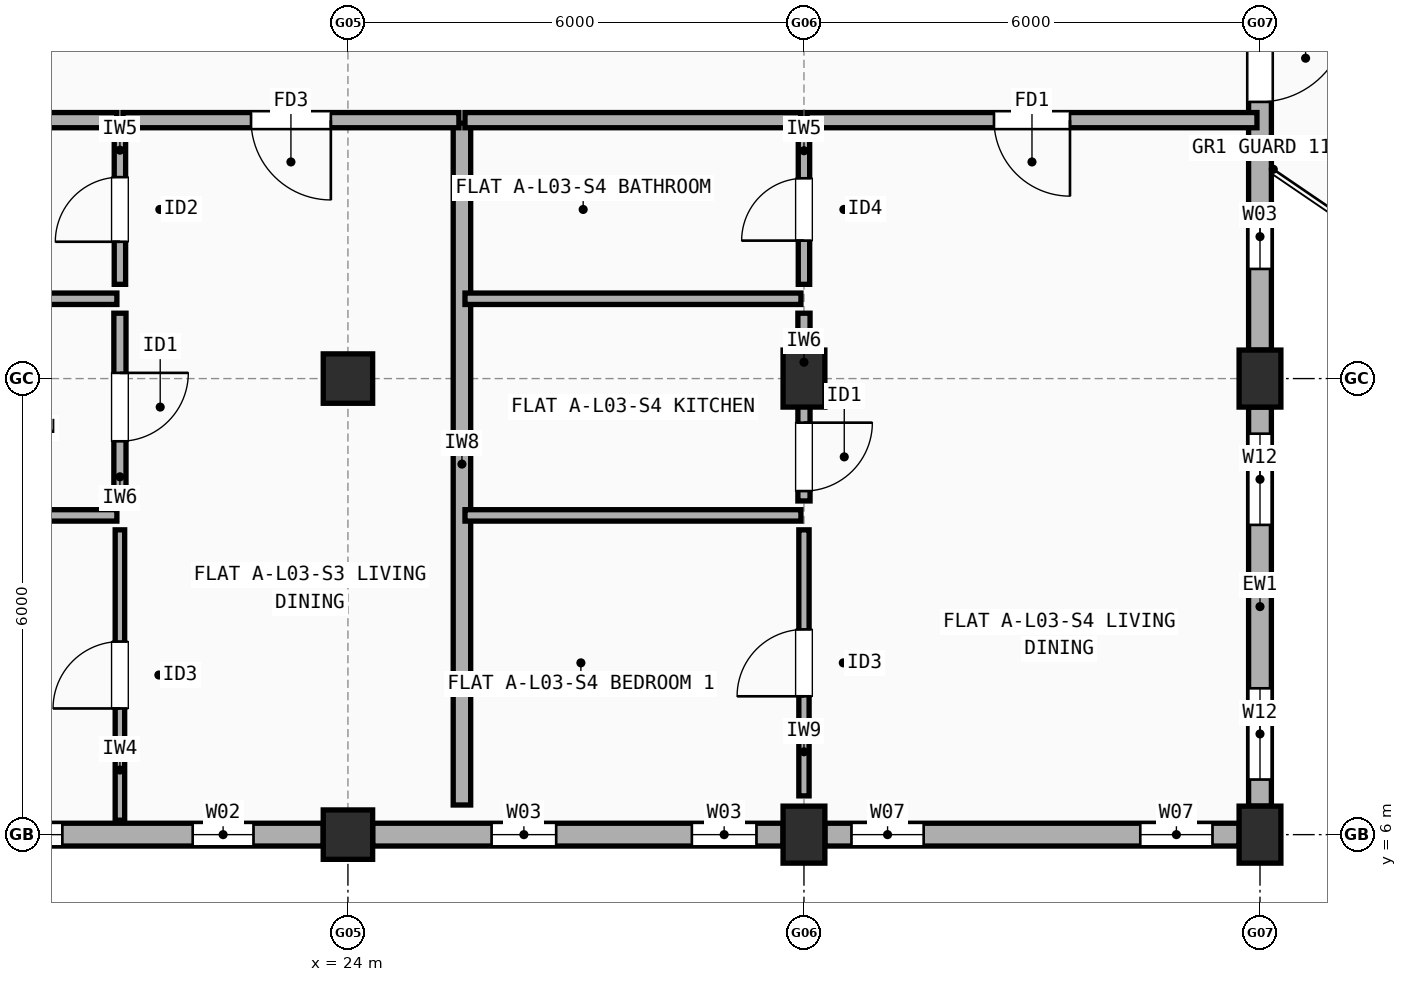
"""IFC4 building model, lengths in metres.
Left out: names, types, materials, properties, quantities, classifications, styles, units other than length and angle.
Written with IfcOpenShell. Run it as: python <this file> out.ifc"""

import sys

from ifc_helpers import new_model, si_unit, direction, frame, frame_2d, origin, origin_2d, place, context, subcontext, project, spatial, rectangle, extrude, element, fill, save


model = new_model("IFC4")
c1 = context("Model", 3, precision=1e-05, world=origin(), true_north=direction((0.0, 1.0)))
c2 = subcontext(c1, "Body", "Model", "MODEL_VIEW")
j1 = project(units=[si_unit("LENGTHUNIT", "METRE"), si_unit("PLANEANGLEUNIT", "RADIAN")], contexts=[c1])
p1 = place(None, origin())
s1 = spatial("IfcSite", under=j1, at=p1, CompositionType="ELEMENT")
p2 = place(p1, origin())
s2 = spatial("IfcBuilding", under=s1, at=p2, CompositionType="ELEMENT")
p3 = place(p2, frame((0.0, 0.0, 10.9)))
s3 = spatial("IfcBuildingStorey", under=s2, at=p3, CompositionType="ELEMENT", Elevation=10.9)
for number, where, z_axis, x_axis in (
    (1, (24.0, 6.0, 0.0), (0.0, 0.0, 1.0), (1.0, 0.0, 0.0)),
    (2, (24.0, 12.0, 0.0), (0.0, 0.0, 1.0), (1.0, 0.0, 0.0)),
):
    element("IfcColumn", number, at=place(p3, frame(where, z_axis=z_axis, x_axis=x_axis)), inside=s3, PredefinedType="COLUMN", context=c2, shape_type="SweptSolid", body=[
        extrude(rectangle(XDim=0.65, YDim=0.65, at=origin_2d()), origin(), (0.0, 0.0, 1.0), 2.96),
    ])
for number, where, z_axis, x_axis in (
    (3, (30.0, 6.0, 0.0), (0.0, 0.0, 1.0), (1.0, 0.0, 0.0)),
    (4, (30.0, 12.0, 0.0), (0.0, 0.0, 1.0), (1.0, 0.0, 0.0)),
    (5, (36.0, 6.0, 0.0), (0.0, 0.0, 1.0), (1.0, 0.0, 0.0)),
    (6, (36.0, 12.0, 0.0), (0.0, 0.0, 1.0), (1.0, 0.0, 0.0)),
):
    element("IfcColumn", number, at=place(p3, frame(where, z_axis=z_axis, x_axis=x_axis)), inside=s3, PredefinedType="COLUMN", context=c2, shape_type="SweptSolid", body=[
        extrude(rectangle(XDim=0.55, YDim=0.75, at=origin_2d()), origin(), (0.0, 0.0, 1.0), 2.96),
    ])
p4 = place(p3, frame((18.325, 6.0, 0.0), z_axis=(0.0, 0.0, 1.0), x_axis=(1.0, 0.0, 0.0)))
e7 = element("IfcWall", 7, at=p4, inside=s3, PredefinedType="STANDARD", context=c2, shape_type="SweptSolid", body=[
    extrude(rectangle(XDim=5.35, YDim=0.3, at=frame_2d((2.675, 0.0))), origin(), (0.0, 0.0, 1.0), 2.442),
])
p5 = place(p4, frame((0.718, 0.0, 0.9)))
e8 = element("IfcOpeningElement", 8, at=p5, cuts=e7, PredefinedType="OPENING", context=c2, shape_type="SweptSolid", body=[
    extrude(rectangle(XDim=1.2, YDim=1.35, at=frame_2d((0.6, 0.675))), frame((0.0, 0.16, 0.0), z_axis=(0.0, -1.0, 0.0), x_axis=(1.0, 0.0, 0.0)), (0.0, 0.0, 1.0), 0.32),
])
p6 = place(p4, frame((3.633, 0.0, 0.9)))
e9 = element("IfcOpeningElement", 9, at=p6, cuts=e7, PredefinedType="OPENING", context=c2, shape_type="SweptSolid", body=[
    extrude(rectangle(XDim=0.8, YDim=1.2, at=frame_2d((0.4, 0.6))), frame((0.0, 0.16, 0.0), z_axis=(0.0, -1.0, 0.0), x_axis=(1.0, 0.0, 0.0)), (0.0, 0.0, 1.0), 0.32),
])
p7 = place(p3, frame((24.325, 6.0, 0.0), z_axis=(0.0, 0.0, 1.0), x_axis=(1.0, 0.0, 0.0)))
e10 = element("IfcWall", 10, at=p7, inside=s3, PredefinedType="STANDARD", context=c2, shape_type="SweptSolid", body=[
    extrude(rectangle(XDim=5.4, YDim=0.3, at=frame_2d((2.7, 0.0))), origin(), (0.0, 0.0, 1.0), 2.442),
])
p8 = place(p7, frame((1.565, 0.0, 0.9)))
e11 = element("IfcOpeningElement", 11, at=p8, cuts=e10, PredefinedType="OPENING", context=c2, shape_type="SweptSolid", body=[
    extrude(rectangle(XDim=0.85, YDim=1.25, at=frame_2d((0.425, 0.625))), frame((0.0, 0.16, 0.0), z_axis=(0.0, -1.0, 0.0), x_axis=(1.0, 0.0, 0.0)), (0.0, 0.0, 1.0), 0.32),
])
p9 = place(p7, frame((4.2, 0.0, 0.9)))
e12 = element("IfcOpeningElement", 12, at=p9, cuts=e10, PredefinedType="OPENING", context=c2, shape_type="SweptSolid", body=[
    extrude(rectangle(XDim=0.85, YDim=1.25, at=frame_2d((0.425, 0.625))), frame((0.0, 0.16, 0.0), z_axis=(0.0, -1.0, 0.0), x_axis=(1.0, 0.0, 0.0)), (0.0, 0.0, 1.0), 0.32),
])
p10 = place(p3, frame((30.275, 6.0, 0.0), z_axis=(0.0, 0.0, 1.0), x_axis=(1.0, 0.0, 0.0)))
e13 = element("IfcWall", 13, at=p10, inside=s3, PredefinedType="STANDARD", context=c2, shape_type="SweptSolid", body=[
    extrude(rectangle(XDim=5.45, YDim=0.3, at=frame_2d((2.725, 0.0))), origin(), (0.0, 0.0, 1.0), 2.442),
])
p11 = place(p10, frame((0.35, 0.0, 0.9)))
e14 = element("IfcOpeningElement", 14, at=p11, cuts=e13, PredefinedType="OPENING", context=c2, shape_type="SweptSolid", body=[
    extrude(rectangle(XDim=0.95, YDim=1.35, at=frame_2d((0.475, 0.675))), frame((0.0, 0.16, 0.0), z_axis=(0.0, -1.0, 0.0), x_axis=(1.0, 0.0, 0.0)), (0.0, 0.0, 1.0), 0.32),
])
p12 = place(p10, frame((4.15, 0.0, 0.9)))
e15 = element("IfcOpeningElement", 15, at=p12, cuts=e13, PredefinedType="OPENING", context=c2, shape_type="SweptSolid", body=[
    extrude(rectangle(XDim=0.95, YDim=1.35, at=frame_2d((0.475, 0.675))), frame((0.0, 0.16, 0.0), z_axis=(0.0, -1.0, 0.0), x_axis=(1.0, 0.0, 0.0)), (0.0, 0.0, 1.0), 0.32),
])
p13 = place(p3, frame((36.0, 6.375, 0.0), z_axis=(0.0, 0.0, 1.0), x_axis=(0.0, 1.0, 0.0)))
e16 = element("IfcWall", 16, at=p13, inside=s3, PredefinedType="STANDARD", context=c2, shape_type="SweptSolid", body=[
    extrude(rectangle(XDim=5.25, YDim=0.3, at=frame_2d((2.625, 0.0))), origin(), (0.0, 0.0, 1.0), 2.442),
])
p14 = place(p13, frame((0.35, 0.0, 0.9)))
e17 = element("IfcOpeningElement", 17, at=p14, cuts=e16, PredefinedType="OPENING", context=c2, shape_type="SweptSolid", body=[
    extrude(rectangle(XDim=1.2, YDim=1.35, at=frame_2d((0.6, 0.675))), frame((0.0, 0.16, 0.0), z_axis=(0.0, -1.0, 0.0), x_axis=(1.0, 0.0, 0.0)), (0.0, 0.0, 1.0), 0.32),
])
p15 = place(p13, frame((3.7, 0.0, 0.9)))
e18 = element("IfcOpeningElement", 18, at=p15, cuts=e16, PredefinedType="OPENING", context=c2, shape_type="SweptSolid", body=[
    extrude(rectangle(XDim=1.2, YDim=1.35, at=frame_2d((0.6, 0.675))), frame((0.0, 0.16, 0.0), z_axis=(0.0, -1.0, 0.0), x_axis=(1.0, 0.0, 0.0)), (0.0, 0.0, 1.0), 0.32),
])
p16 = place(p3, frame((36.0, 12.375, 0.0), z_axis=(0.0, 0.0, 1.0), x_axis=(0.0, 1.0, 0.0)))
e19 = element("IfcWall", 19, at=p16, inside=s3, PredefinedType="STANDARD", context=c2, shape_type="SweptSolid", body=[
    extrude(rectangle(XDim=5.25, YDim=0.3, at=frame_2d((2.625, 0.0))), origin(), (0.0, 0.0, 1.0), 2.442),
])
p17 = place(p16, frame((3.265, 0.0, 0.0)))
e20 = element("IfcOpeningElement", 20, at=p17, cuts=e19, PredefinedType="OPENING", context=c2, shape_type="SweptSolid", body=[
    extrude(rectangle(XDim=1.15, YDim=2.15, at=frame_2d((0.575, 1.075))), frame((0.0, 0.16, 0.0), z_axis=(0.0, -1.0, 0.0), x_axis=(1.0, 0.0, 0.0)), (0.0, 0.0, 1.0), 0.32),
])
p18 = place(p16, frame((1.067, 0.0, 0.9)))
e21 = element("IfcOpeningElement", 21, at=p18, cuts=e19, PredefinedType="OPENING", context=c2, shape_type="SweptSolid", body=[
    extrude(rectangle(XDim=0.85, YDim=1.25, at=frame_2d((0.425, 0.625))), frame((0.0, 0.16, 0.0), z_axis=(0.0, -1.0, 0.0), x_axis=(1.0, 0.0, 0.0)), (0.0, 0.0, 1.0), 0.32),
])
p19 = place(p3, frame((25.5, 6.39, 0.0), z_axis=(0.0, 0.0, 1.0), x_axis=(0.0, 1.0, 0.0)))
e22 = element("IfcWall", 22, at=p19, inside=s3, PredefinedType="SOLIDWALL", context=c2, shape_type="SweptSolid", body=[
    extrude(rectangle(XDim=8.97, YDim=0.23, at=frame_2d((4.485, 0.0))), origin(), (0.0, 0.0, 1.0), 2.548),
])
p20 = place(p3, frame((16.54, 15.4, 0.0), z_axis=(0.0, 0.0, 1.0), x_axis=(1.0, 0.0, 0.0)))
e23 = element("IfcWall", 23, at=p20, inside=s3, PredefinedType="SOLIDWALL", context=c2, shape_type="SweptSolid", body=[
    extrude(rectangle(XDim=4.42, YDim=0.2, at=frame_2d((2.21, 0.0))), origin(), (0.0, 0.0, 1.0), 2.508),
])
p21 = place(p3, frame((21.04, 15.4, 0.0), z_axis=(0.0, 0.0, 1.0), x_axis=(1.0, 0.0, 0.0)))
e24 = element("IfcWall", 24, at=p21, inside=s3, PredefinedType="SOLIDWALL", context=c2, shape_type="SweptSolid", body=[
    extrude(rectangle(XDim=4.42, YDim=0.2, at=frame_2d((2.21, 0.0))), origin(), (0.0, 0.0, 1.0), 2.458),
])
p22 = place(p21, frame((1.685, 0.0, 0.0)))
e25 = element("IfcOpeningElement", 25, at=p22, cuts=e24, PredefinedType="OPENING", context=c2, shape_type="SweptSolid", body=[
    extrude(rectangle(XDim=1.05, YDim=2.15, at=frame_2d((0.525, 1.075))), frame((0.0, 0.11, 0.0), z_axis=(0.0, -1.0, 0.0), x_axis=(1.0, 0.0, 0.0)), (0.0, 0.0, 1.0), 0.22),
])
p23 = place(p3, frame((21.0, 6.19, 0.0), z_axis=(0.0, 0.0, 1.0), x_axis=(0.0, 1.0, 0.0)))
e26 = element("IfcWall", 26, at=p23, inside=s3, PredefinedType="PARTITIONING", context=c2, shape_type="SweptSolid", body=[
    extrude(rectangle(XDim=3.82, YDim=0.125, at=frame_2d((1.91, 0.0))), origin(), (0.0, 0.0, 1.0), 2.96),
])
p24 = place(p23, frame((1.47, 0.0, 0.0)))
e27 = element("IfcOpeningElement", 27, at=p24, cuts=e26, PredefinedType="OPENING", context=c2, shape_type="SweptSolid", body=[
    extrude(rectangle(XDim=0.88, YDim=2.1, at=frame_2d((0.44, 1.05))), frame((0.0, 0.073, 0.0), z_axis=(0.0, -1.0, 0.0), x_axis=(1.0, 0.0, 0.0)), (0.0, 0.0, 1.0), 0.145),
])
p25 = place(p3, frame((21.0, 10.39, 0.0), z_axis=(0.0, 0.0, 1.0), x_axis=(0.0, 1.0, 0.0)))
e28 = element("IfcWall", 28, at=p25, inside=s3, PredefinedType="PLUMBINGWALL", context=c2, shape_type="SweptSolid", body=[
    extrude(rectangle(XDim=2.47, YDim=0.16, at=frame_2d((1.235, 0.0))), origin(), (0.0, 0.0, 1.0), 2.408),
])
p26 = place(p25, frame((0.785, 0.0, 0.0)))
e29 = element("IfcOpeningElement", 29, at=p26, cuts=e28, PredefinedType="OPENING", context=c2, shape_type="SweptSolid", body=[
    extrude(rectangle(XDim=0.9, YDim=2.1, at=frame_2d((0.45, 1.05))), frame((0.0, 0.09, 0.0), z_axis=(0.0, -1.0, 0.0), x_axis=(1.0, 0.0, 0.0)), (0.0, 0.0, 1.0), 0.18),
])
p27 = place(p3, frame((21.0, 13.24, 0.0), z_axis=(0.0, 0.0, 1.0), x_axis=(0.0, 1.0, 0.0)))
e30 = element("IfcWall", 30, at=p27, inside=s3, PredefinedType="PARTITIONING", context=c2, shape_type="SweptSolid", body=[
    extrude(rectangle(XDim=1.97, YDim=0.15, at=frame_2d((0.985, 0.0))), origin(), (0.0, 0.0, 1.0), 2.96),
])
p28 = place(p27, frame((0.56, 0.0, 0.0)))
e31 = element("IfcOpeningElement", 31, at=p28, cuts=e30, PredefinedType="OPENING", context=c2, shape_type="SweptSolid", body=[
    extrude(rectangle(XDim=0.85, YDim=2.1, at=frame_2d((0.425, 1.05))), frame((0.0, 0.085, 0.0), z_axis=(0.0, -1.0, 0.0), x_axis=(1.0, 0.0, 0.0)), (0.0, 0.0, 1.0), 0.17),
])
p29 = place(p3, frame((16.54, 10.2, 0.0), z_axis=(0.0, 0.0, 1.0), x_axis=(1.0, 0.0, 0.0)))
e32 = element("IfcWall", 32, at=p29, inside=s3, PredefinedType="PARTITIONING", context=c2, shape_type="SweptSolid", body=[
    extrude(rectangle(XDim=4.42, YDim=0.15, at=frame_2d((2.21, 0.0))), origin(), (0.0, 0.0, 1.0), 2.548),
])
p30 = place(p3, frame((16.54, 13.05, 0.0), z_axis=(0.0, 0.0, 1.0), x_axis=(1.0, 0.0, 0.0)))
e33 = element("IfcWall", 33, at=p30, inside=s3, PredefinedType="PARTITIONING", context=c2, shape_type="SweptSolid", body=[
    extrude(rectangle(XDim=4.42, YDim=0.15, at=frame_2d((2.21, 0.0))), origin(), (0.0, 0.0, 1.0), 2.508),
])
p31 = place(p3, frame((25.54, 15.4, 0.0), z_axis=(0.0, 0.0, 1.0), x_axis=(1.0, 0.0, 0.0)))
e34 = element("IfcWall", 34, at=p31, inside=s3, PredefinedType="SOLIDWALL", context=c2, shape_type="SweptSolid", body=[
    extrude(rectangle(XDim=4.42, YDim=0.2, at=frame_2d((2.21, 0.0))), origin(), (0.0, 0.0, 1.0), 2.442),
])
p32 = place(p3, frame((30.04, 15.4, 0.0), z_axis=(0.0, 0.0, 1.0), x_axis=(1.0, 0.0, 0.0)))
e35 = element("IfcWall", 35, at=p32, inside=s3, PredefinedType="SOLIDWALL", context=c2, shape_type="SweptSolid", body=[
    extrude(rectangle(XDim=5.92, YDim=0.2, at=frame_2d((2.96, 0.0))), origin(), (0.0, 0.0, 1.0), 2.442),
])
p33 = place(p32, frame((2.46, 0.0, 0.0)))
e36 = element("IfcOpeningElement", 36, at=p33, cuts=e35, PredefinedType="OPENING", context=c2, shape_type="SweptSolid", body=[
    extrude(rectangle(XDim=1.0, YDim=2.15, at=frame_2d((0.5, 1.075))), frame((0.0, 0.11, 0.0), z_axis=(0.0, -1.0, 0.0), x_axis=(1.0, 0.0, 0.0)), (0.0, 0.0, 1.0), 0.22),
])
p34 = place(p3, frame((30.0, 6.51, 0.0), z_axis=(0.0, 0.0, 1.0), x_axis=(0.0, 1.0, 0.0)))
e37 = element("IfcWall", 37, at=p34, inside=s3, PredefinedType="PARTITIONING", context=c2, shape_type="SweptSolid", body=[
    extrude(rectangle(XDim=3.5, YDim=0.135, at=frame_2d((1.75, 0.0))), origin(), (0.0, 0.0, 1.0), 2.442),
])
p35 = place(p34, frame((1.31, 0.0, 0.0)))
e38 = element("IfcOpeningElement", 38, at=p35, cuts=e37, PredefinedType="OPENING", context=c2, shape_type="SweptSolid", body=[
    extrude(rectangle(XDim=0.88, YDim=2.1, at=frame_2d((0.44, 1.05))), frame((0.0, 0.077, 0.0), z_axis=(0.0, -1.0, 0.0), x_axis=(1.0, 0.0, 0.0)), (0.0, 0.0, 1.0), 0.155),
])
p36 = place(p3, frame((30.0, 10.39, 0.0), z_axis=(0.0, 0.0, 1.0), x_axis=(0.0, 1.0, 0.0)))
e39 = element("IfcWall", 39, at=p36, inside=s3, PredefinedType="PLUMBINGWALL", context=c2, shape_type="SweptSolid", body=[
    extrude(rectangle(XDim=2.47, YDim=0.16, at=frame_2d((1.235, 0.0))), origin(), (0.0, 0.0, 1.0), 2.442),
])
p37 = place(p36, frame((0.13, 0.0, 0.0)))
e40 = element("IfcOpeningElement", 40, at=p37, cuts=e39, PredefinedType="OPENING", context=c2, shape_type="SweptSolid", body=[
    extrude(rectangle(XDim=0.9, YDim=2.1, at=frame_2d((0.45, 1.05))), frame((0.0, 0.09, 0.0), z_axis=(0.0, -1.0, 0.0), x_axis=(1.0, 0.0, 0.0)), (0.0, 0.0, 1.0), 0.18),
])
p38 = place(p3, frame((30.0, 13.24, 0.0), z_axis=(0.0, 0.0, 1.0), x_axis=(0.0, 1.0, 0.0)))
e41 = element("IfcWall", 41, at=p38, inside=s3, PredefinedType="PARTITIONING", context=c2, shape_type="SweptSolid", body=[
    extrude(rectangle(XDim=1.97, YDim=0.15, at=frame_2d((0.985, 0.0))), origin(), (0.0, 0.0, 1.0), 2.442),
])
p39 = place(p38, frame((0.575, 0.0, 0.0)))
e42 = element("IfcOpeningElement", 42, at=p39, cuts=e41, PredefinedType="OPENING", context=c2, shape_type="SweptSolid", body=[
    extrude(rectangle(XDim=0.82, YDim=2.08, at=frame_2d((0.41, 1.04))), frame((0.0, 0.085, 0.0), z_axis=(0.0, -1.0, 0.0), x_axis=(1.0, 0.0, 0.0)), (0.0, 0.0, 1.0), 0.17),
])
for number, where, z_axis, x_axis in (
    (43, (25.54, 10.2, 0.0), (0.0, 0.0, 1.0), (1.0, 0.0, 0.0)),
    (44, (25.54, 13.05, 0.0), (0.0, 0.0, 1.0), (1.0, 0.0, 0.0)),
):
    element("IfcWall", number, at=place(p3, frame(where, z_axis=z_axis, x_axis=x_axis)), inside=s3, PredefinedType="PARTITIONING", context=c2, shape_type="SweptSolid", body=[
        extrude(rectangle(XDim=4.42, YDim=0.15, at=frame_2d((2.21, 0.0))), origin(), (0.0, 0.0, 1.0), 2.442),
    ])
p40 = place(p5, origin())
e45 = element("IfcWindow", 45, at=p40, inside=s3, PartitioningType="SINGLE_PANEL", PredefinedType="WINDOW", context=c2, shape_type="SweptSolid", body=[
    extrude(rectangle(XDim=1.2, YDim=1.35, at=frame_2d((0.6, 0.675))), frame((0.0, 0.03, 0.0), z_axis=(0.0, -1.0, 0.0), x_axis=(1.0, 0.0, 0.0)), (0.0, 0.0, 1.0), 0.06),
])
fill(e8, e45)
p41 = place(p6, origin())
e46 = element("IfcWindow", 46, at=p41, inside=s3, PartitioningType="SINGLE_PANEL", PredefinedType="WINDOW", context=c2, shape_type="SweptSolid", body=[
    extrude(rectangle(XDim=0.8, YDim=1.2, at=frame_2d((0.4, 0.6))), frame((0.0, 0.03, 0.0), z_axis=(0.0, -1.0, 0.0), x_axis=(1.0, 0.0, 0.0)), (0.0, 0.0, 1.0), 0.06),
])
fill(e9, e46)
p42 = place(p8, origin())
e47 = element("IfcWindow", 47, at=p42, inside=s3, PartitioningType="SINGLE_PANEL", PredefinedType="WINDOW", context=c2, shape_type="SweptSolid", body=[
    extrude(rectangle(XDim=0.85, YDim=1.25, at=frame_2d((0.425, 0.625))), frame((0.0, 0.03, 0.0), z_axis=(0.0, -1.0, 0.0), x_axis=(1.0, 0.0, 0.0)), (0.0, 0.0, 1.0), 0.06),
])
fill(e11, e47)
p43 = place(p9, origin())
e48 = element("IfcWindow", 48, at=p43, inside=s3, PartitioningType="SINGLE_PANEL", PredefinedType="WINDOW", context=c2, shape_type="SweptSolid", body=[
    extrude(rectangle(XDim=0.85, YDim=1.25, at=frame_2d((0.425, 0.625))), frame((0.0, 0.03, 0.0), z_axis=(0.0, -1.0, 0.0), x_axis=(1.0, 0.0, 0.0)), (0.0, 0.0, 1.0), 0.06),
])
fill(e12, e48)
p44 = place(p11, origin())
e49 = element("IfcWindow", 49, at=p44, inside=s3, PartitioningType="SINGLE_PANEL", PredefinedType="WINDOW", context=c2, shape_type="SweptSolid", body=[
    extrude(rectangle(XDim=0.95, YDim=1.35, at=frame_2d((0.475, 0.675))), frame((0.0, 0.03, 0.0), z_axis=(0.0, -1.0, 0.0), x_axis=(1.0, 0.0, 0.0)), (0.0, 0.0, 1.0), 0.06),
])
fill(e14, e49)
p45 = place(p12, origin())
e50 = element("IfcWindow", 50, at=p45, inside=s3, PartitioningType="SINGLE_PANEL", PredefinedType="WINDOW", context=c2, shape_type="SweptSolid", body=[
    extrude(rectangle(XDim=0.95, YDim=1.35, at=frame_2d((0.475, 0.675))), frame((0.0, 0.03, 0.0), z_axis=(0.0, -1.0, 0.0), x_axis=(1.0, 0.0, 0.0)), (0.0, 0.0, 1.0), 0.06),
])
fill(e15, e50)
p46 = place(p14, origin())
e51 = element("IfcWindow", 51, at=p46, inside=s3, PartitioningType="SINGLE_PANEL", PredefinedType="WINDOW", context=c2, shape_type="SweptSolid", body=[
    extrude(rectangle(XDim=1.2, YDim=1.35, at=frame_2d((0.6, 0.675))), frame((0.0, 0.03, 0.0), z_axis=(0.0, -1.0, 0.0), x_axis=(1.0, 0.0, 0.0)), (0.0, 0.0, 1.0), 0.06),
])
fill(e17, e51)
p47 = place(p15, origin())
e52 = element("IfcWindow", 52, at=p47, inside=s3, PartitioningType="SINGLE_PANEL", PredefinedType="WINDOW", context=c2, shape_type="SweptSolid", body=[
    extrude(rectangle(XDim=1.2, YDim=1.35, at=frame_2d((0.6, 0.675))), frame((0.0, 0.03, 0.0), z_axis=(0.0, -1.0, 0.0), x_axis=(1.0, 0.0, 0.0)), (0.0, 0.0, 1.0), 0.06),
])
fill(e18, e52)
p48 = place(p17, frame((1.15, 0.0, 0.0), z_axis=(0.0, 0.0, 1.0), x_axis=(-1.0, 0.0, 0.0)))
e53 = element("IfcDoor", 53, at=p48, inside=s3, OperationType="SINGLE_SWING_RIGHT", PredefinedType="DOOR", context=c2, shape_type="SweptSolid", body=[
    extrude(rectangle(XDim=1.15, YDim=2.15, at=frame_2d((0.575, 1.075))), frame((0.0, 0.025, 0.0), z_axis=(0.0, -1.0, 0.0), x_axis=(1.0, 0.0, 0.0)), (0.0, 0.0, 1.0), 0.05),
])
fill(e20, e53)
p49 = place(p18, origin())
e54 = element("IfcWindow", 54, at=p49, inside=s3, PartitioningType="SINGLE_PANEL", PredefinedType="WINDOW", context=c2, shape_type="SweptSolid", body=[
    extrude(rectangle(XDim=0.85, YDim=1.25, at=frame_2d((0.425, 0.625))), frame((0.0, 0.03, 0.0), z_axis=(0.0, -1.0, 0.0), x_axis=(1.0, 0.0, 0.0)), (0.0, 0.0, 1.0), 0.06),
])
fill(e21, e54)
p50 = place(p22, origin())
e55 = element("IfcDoor", 55, at=p50, inside=s3, OperationType="SINGLE_SWING_RIGHT", PredefinedType="DOOR", context=c2, shape_type="SweptSolid", body=[
    extrude(rectangle(XDim=1.05, YDim=2.15, at=frame_2d((0.525, 1.075))), frame((0.0, 0.025, 0.0), z_axis=(0.0, -1.0, 0.0), x_axis=(1.0, 0.0, 0.0)), (0.0, 0.0, 1.0), 0.05),
])
fill(e25, e55)
p51 = place(p24, origin())
e56 = element("IfcDoor", 56, at=p51, inside=s3, OperationType="SINGLE_SWING_LEFT", PredefinedType="DOOR", context=c2, shape_type="SweptSolid", body=[
    extrude(rectangle(XDim=0.88, YDim=2.1, at=frame_2d((0.44, 1.05))), frame((0.0, 0.025, 0.0), z_axis=(0.0, -1.0, 0.0), x_axis=(1.0, 0.0, 0.0)), (0.0, 0.0, 1.0), 0.05),
])
fill(e27, e56)
p52 = place(p26, origin())
e57 = element("IfcDoor", 57, at=p52, inside=s3, OperationType="SINGLE_SWING_RIGHT", PredefinedType="DOOR", context=c2, shape_type="SweptSolid", body=[
    extrude(rectangle(XDim=0.9, YDim=2.1, at=frame_2d((0.45, 1.05))), frame((0.0, 0.025, 0.0), z_axis=(0.0, -1.0, 0.0), x_axis=(1.0, 0.0, 0.0)), (0.0, 0.0, 1.0), 0.05),
])
fill(e29, e57)
p53 = place(p28, origin())
e58 = element("IfcDoor", 58, at=p53, inside=s3, OperationType="SINGLE_SWING_LEFT", PredefinedType="DOOR", context=c2, shape_type="SweptSolid", body=[
    extrude(rectangle(XDim=0.85, YDim=2.1, at=frame_2d((0.425, 1.05))), frame((0.0, 0.025, 0.0), z_axis=(0.0, -1.0, 0.0), x_axis=(1.0, 0.0, 0.0)), (0.0, 0.0, 1.0), 0.05),
])
fill(e31, e58)
p54 = place(p33, origin())
e59 = element("IfcDoor", 59, at=p54, inside=s3, OperationType="SINGLE_SWING_RIGHT", PredefinedType="DOOR", context=c2, shape_type="SweptSolid", body=[
    extrude(rectangle(XDim=1.0, YDim=2.15, at=frame_2d((0.5, 1.075))), frame((0.0, 0.025, 0.0), z_axis=(0.0, -1.0, 0.0), x_axis=(1.0, 0.0, 0.0)), (0.0, 0.0, 1.0), 0.05),
])
fill(e36, e59)
p55 = place(p35, origin())
e60 = element("IfcDoor", 60, at=p55, inside=s3, OperationType="SINGLE_SWING_LEFT", PredefinedType="DOOR", context=c2, shape_type="SweptSolid", body=[
    extrude(rectangle(XDim=0.88, YDim=2.1, at=frame_2d((0.44, 1.05))), frame((0.0, 0.025, 0.0), z_axis=(0.0, -1.0, 0.0), x_axis=(1.0, 0.0, 0.0)), (0.0, 0.0, 1.0), 0.05),
])
fill(e38, e60)
p56 = place(p37, origin())
e61 = element("IfcDoor", 61, at=p56, inside=s3, OperationType="SINGLE_SWING_RIGHT", PredefinedType="DOOR", context=c2, shape_type="SweptSolid", body=[
    extrude(rectangle(XDim=0.9, YDim=2.1, at=frame_2d((0.45, 1.05))), frame((0.0, 0.025, 0.0), z_axis=(0.0, -1.0, 0.0), x_axis=(1.0, 0.0, 0.0)), (0.0, 0.0, 1.0), 0.05),
])
fill(e40, e61)
p57 = place(p39, origin())
e62 = element("IfcDoor", 62, at=p57, inside=s3, OperationType="SINGLE_SWING_LEFT", PredefinedType="DOOR", context=c2, shape_type="SweptSolid", body=[
    extrude(rectangle(XDim=0.82, YDim=2.08, at=frame_2d((0.41, 1.04))), frame((0.0, 0.025, 0.0), z_axis=(0.0, -1.0, 0.0), x_axis=(1.0, 0.0, 0.0)), (0.0, 0.0, 1.0), 0.05),
])
fill(e42, e62)
save(model, sys.argv[1])
